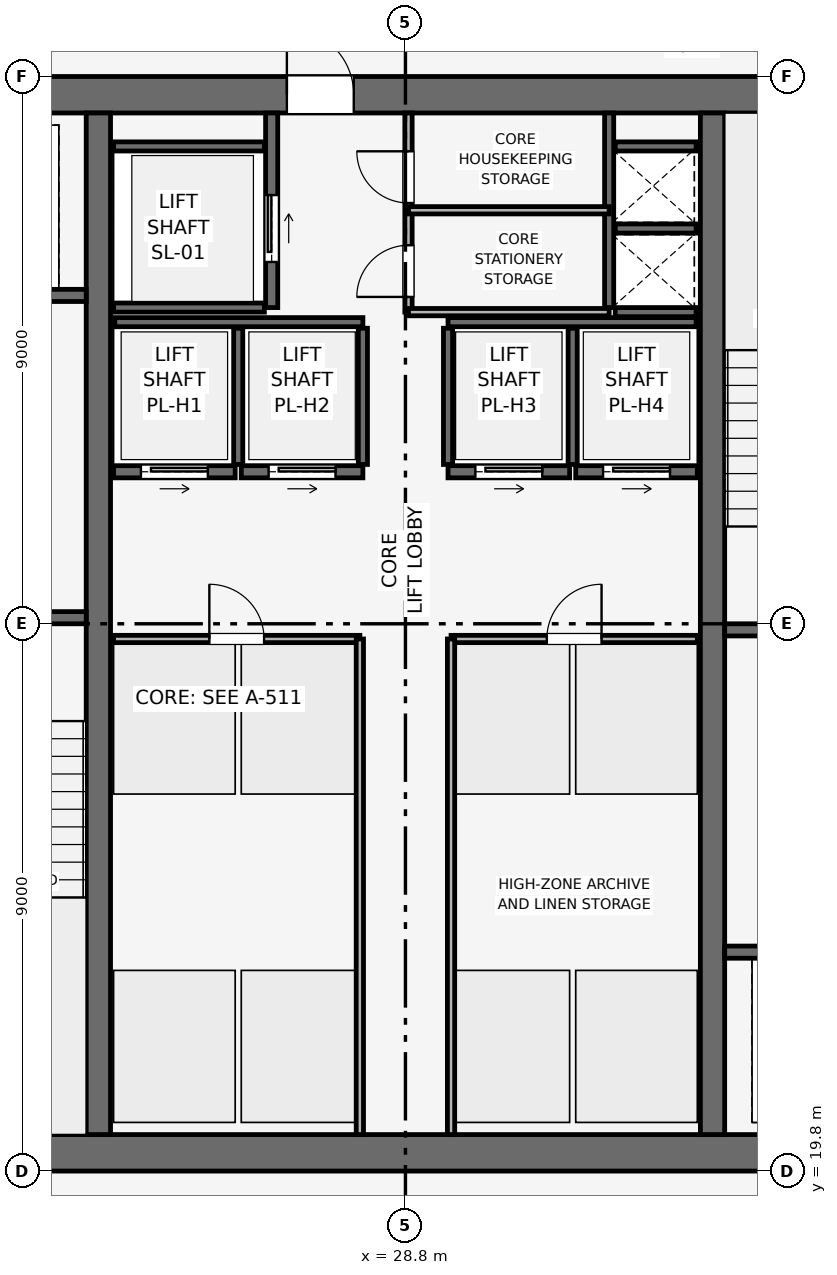
"""IFC4 building model, lengths in metres.
Left out: names, types, materials, properties, quantities, classifications, styles, units other than length and angle.
Written with IfcOpenShell. Run it as: python <this file> out.ifc"""

import sys

from ifc_helpers import new_model, si_unit, direction, frame, frame_2d, origin, place, context, subcontext, project, spatial, rectangle, extrude, element, fill, save


model = new_model("IFC4")
c1 = context("Model", 3, precision=1e-05, world=origin(), true_north=direction((0.0, 1.0)))
c2 = subcontext(c1, "Body", "Model", "MODEL_VIEW")
j1 = project(units=[si_unit("LENGTHUNIT", "METRE"), si_unit("PLANEANGLEUNIT", "RADIAN")], contexts=[c1])
p1 = place(None, origin())
s1 = spatial("IfcSite", under=j1, at=p1, CompositionType="ELEMENT")
p2 = place(p1, origin())
s2 = spatial("IfcBuilding", under=s1, at=p2, CompositionType="ELEMENT")
p3 = place(p2, frame((0.0, 0.0, 318.0)))
s3 = spatial("IfcBuildingStorey", under=s2, at=p3, CompositionType="ELEMENT", Elevation=318.0)
p4 = place(p3, frame((19.8, 20.1, 0.0), z_axis=(0.0, 0.0, 1.0), x_axis=(1.0, 0.0, 0.0)))
e1 = element("IfcWall", 1, at=p4, inside=s3, PredefinedType="SHEAR", context=c2, shape_type="SweptSolid", body=[
    extrude(rectangle(XDim=18.0, YDim=0.6, at=frame_2d((9.0, 0.0))), origin(), (0.0, 0.0, 1.0), 3.75),
])
p5 = place(p3, frame((19.8, 37.5, 0.0), z_axis=(0.0, 0.0, 1.0), x_axis=(1.0, 0.0, 0.0)))
e2 = element("IfcWall", 2, at=p5, inside=s3, PredefinedType="SHEAR", context=c2, shape_type="SweptSolid", body=[
    extrude(rectangle(XDim=18.0, YDim=0.6, at=frame_2d((9.0, 0.0))), origin(), (0.0, 0.0, 1.0), 3.75),
])
p6 = place(p5, frame((7.05, 0.0, 0.0)))
e3 = element("IfcOpeningElement", 3, at=p6, cuts=e2, PredefinedType="OPENING", context=c2, shape_type="SweptSolid", body=[
    extrude(rectangle(XDim=1.1, YDim=2.15, at=frame_2d((0.55, 1.075))), frame((0.0, 0.31, 0.0), z_axis=(0.0, -1.0, 0.0), x_axis=(1.0, 0.0, 0.0)), (0.0, 0.0, 1.0), 0.62),
])
for number, where, z_axis, x_axis in (
    (4, (23.75, 20.4, 0.0), (0.0, 0.0, 1.0), (0.0, 1.0, 0.0)),
    (5, (33.85, 20.4, 0.0), (0.0, 0.0, 1.0), (0.0, 1.0, 0.0)),
):
    element("IfcWall", number, at=place(p3, frame(where, z_axis=z_axis, x_axis=x_axis)), inside=s3, PredefinedType="SHEAR", context=c2, shape_type="SweptSolid", body=[
        extrude(rectangle(XDim=16.8, YDim=0.4, at=frame_2d((8.4, 0.0))), origin(), (0.0, 0.0, 1.0), 3.75),
    ])
p7 = place(p3, frame((20.4, 28.9, 0.0), z_axis=(0.0, 0.0, 1.0), x_axis=(1.0, 0.0, 0.0)))
e6 = element("IfcWall", 6, at=p7, inside=s3, PredefinedType="SHEAR", context=c2, shape_type="SweptSolid", body=[
    extrude(rectangle(XDim=3.15, YDim=0.2, at=frame_2d((1.575, 0.0))), origin(), (0.0, 0.0, 1.0), 3.51),
])
p8 = place(p7, frame((0.8, 0.0, 0.0)))
e7 = element("IfcOpeningElement", 7, at=p8, cuts=e6, PredefinedType="OPENING", context=c2, shape_type="SweptSolid", body=[
    extrude(rectangle(XDim=1.0, YDim=2.1, at=frame_2d((0.5, 1.05))), frame((0.0, 0.11, 0.0), z_axis=(0.0, -1.0, 0.0), x_axis=(1.0, 0.0, 0.0)), (0.0, 0.0, 1.0), 0.22),
])
p9 = place(p3, frame((34.05, 28.7, 0.0), z_axis=(0.0, 0.0, 1.0), x_axis=(1.0, 0.0, 0.0)))
e8 = element("IfcWall", 8, at=p9, inside=s3, PredefinedType="SHEAR", context=c2, shape_type="SweptSolid", body=[
    extrude(rectangle(XDim=3.15, YDim=0.2, at=frame_2d((1.575, 0.0))), origin(), (0.0, 0.0, 1.0), 3.51),
])
p10 = place(p9, frame((0.8, 0.0, 0.0)))
e9 = element("IfcOpeningElement", 9, at=p10, cuts=e8, PredefinedType="OPENING", context=c2, shape_type="SweptSolid", body=[
    extrude(rectangle(XDim=1.0, YDim=2.1, at=frame_2d((0.5, 1.05))), frame((0.0, 0.11, 0.0), z_axis=(0.0, -1.0, 0.0), x_axis=(1.0, 0.0, 0.0)), (0.0, 0.0, 1.0), 0.22),
])
p11 = place(p3, frame((32.15, 34.0, 0.0), z_axis=(0.0, 0.0, 1.0), x_axis=(0.0, 1.0, 0.0)))
e10 = element("IfcWall", 10, at=p11, inside=s3, PredefinedType="SHEAR", context=c2, shape_type="SweptSolid", body=[
    extrude(rectangle(XDim=3.2, YDim=0.15, at=frame_2d((1.6, 0.0))), origin(), (0.0, 0.0, 1.0), 3.51),
])
for number, where, z_axis, x_axis in (
    (11, (32.25, 33.925, 0.0), (0.0, 0.0, 1.0), (1.0, 0.0, 0.0)),
    (12, (32.25, 35.3, 0.0), (0.0, 0.0, 1.0), (1.0, 0.0, 0.0)),
):
    element("IfcWall", number, at=place(p3, frame(where, z_axis=z_axis, x_axis=x_axis)), inside=s3, PredefinedType="SHEAR", context=c2, shape_type="SweptSolid", body=[
        extrude(rectangle(XDim=1.33, YDim=0.15, at=frame_2d((0.665, 0.0))), origin(), (0.0, 0.0, 1.0), 3.51),
    ])
p12 = place(p3, frame((20.5, 34.2, 0.0), z_axis=(0.0, 0.0, 1.0), x_axis=(1.0, 0.0, 0.0)))
e13 = element("IfcWall", 13, at=p12, inside=s3, PredefinedType="SHEAR", context=c2, shape_type="SweptSolid", body=[
    extrude(rectangle(XDim=3.05, YDim=0.2, at=frame_2d((1.525, 0.0))), origin(), (0.0, 0.0, 1.0), 3.51),
])
p13 = place(p12, frame((0.75, 0.0, 0.0)))
e14 = element("IfcOpeningElement", 14, at=p13, cuts=e13, PredefinedType="OPENING", context=c2, shape_type="SweptSolid", body=[
    extrude(rectangle(XDim=1.1, YDim=2.15, at=frame_2d((0.55, 1.075))), frame((0.0, 0.11, 0.0), z_axis=(0.0, -1.0, 0.0), x_axis=(1.0, 0.0, 0.0)), (0.0, 0.0, 1.0), 0.22),
])
p14 = place(p3, frame((34.05, 23.4, 0.0), z_axis=(0.0, 0.0, 1.0), x_axis=(1.0, 0.0, 0.0)))
e15 = element("IfcWall", 15, at=p14, inside=s3, PredefinedType="SHEAR", context=c2, shape_type="SweptSolid", body=[
    extrude(rectangle(XDim=3.05, YDim=0.2, at=frame_2d((1.525, 0.0))), origin(), (0.0, 0.0, 1.0), 3.51),
])
p15 = place(p14, frame((1.2, 0.0, 0.0)))
e16 = element("IfcOpeningElement", 16, at=p15, cuts=e15, PredefinedType="OPENING", context=c2, shape_type="SweptSolid", body=[
    extrude(rectangle(XDim=1.1, YDim=2.15, at=frame_2d((0.55, 1.075))), frame((0.0, 0.11, 0.0), z_axis=(0.0, -1.0, 0.0), x_axis=(1.0, 0.0, 0.0)), (0.0, 0.0, 1.0), 0.22),
])
p16 = place(p3, frame((26.6, 34.0, 0.0), z_axis=(0.0, 0.0, 1.0), x_axis=(0.0, 1.0, 0.0)))
e17 = element("IfcWall", 17, at=p16, inside=s3, PredefinedType="SHEAR", context=c2, shape_type="SweptSolid", body=[
    extrude(rectangle(XDim=3.2, YDim=0.2, at=frame_2d((1.6, 0.0))), origin(), (0.0, 0.0, 1.0), 3.51),
])
p17 = place(p16, frame((0.75, 0.0, 0.0)))
e18 = element("IfcOpeningElement", 18, at=p17, cuts=e17, PredefinedType="OPENING", context=c2, shape_type="SweptSolid", body=[
    extrude(rectangle(XDim=1.1, YDim=2.15, at=frame_2d((0.55, 1.075))), frame((0.0, 0.11, 0.0), z_axis=(0.0, -1.0, 0.0), x_axis=(1.0, 0.0, 0.0)), (0.0, 0.0, 1.0), 0.22),
])
for number, where, z_axis, x_axis in (
    (19, (24.0, 34.0, 0.0), (0.0, 0.0, 1.0), (1.0, 0.0, 0.0)),
    (20, (24.0, 36.65, 0.0), (0.0, 0.0, 1.0), (1.0, 0.0, 0.0)),
):
    element("IfcWall", number, at=place(p3, frame(where, z_axis=z_axis, x_axis=x_axis)), inside=s3, PredefinedType="SHEAR", context=c2, shape_type="SweptSolid", body=[
        extrude(rectangle(XDim=2.48, YDim=0.15, at=frame_2d((1.24, 0.0))), origin(), (0.0, 0.0, 1.0), 3.51),
    ])
p18 = place(p3, frame((24.0, 31.3, 0.0), z_axis=(0.0, 0.0, 1.0), x_axis=(1.0, 0.0, 0.0)))
e21 = element("IfcWall", 21, at=p18, inside=s3, PredefinedType="SHEAR", context=c2, shape_type="SweptSolid", body=[
    extrude(rectangle(XDim=2.0, YDim=0.2, at=frame_2d((1.0, 0.0))), origin(), (0.0, 0.0, 1.0), 3.51),
])
p19 = place(p18, frame((0.45, 0.0, 0.0)))
e22 = element("IfcOpeningElement", 22, at=p19, cuts=e21, PredefinedType="OPENING", context=c2, shape_type="SweptSolid", body=[
    extrude(rectangle(XDim=1.1, YDim=2.15, at=frame_2d((0.55, 1.075))), frame((0.0, 0.11, 0.0), z_axis=(0.0, -1.0, 0.0), x_axis=(1.0, 0.0, 0.0)), (0.0, 0.0, 1.0), 0.22),
])
p20 = place(p3, frame((26.1, 31.3, 0.0), z_axis=(0.0, 0.0, 1.0), x_axis=(1.0, 0.0, 0.0)))
e23 = element("IfcWall", 23, at=p20, inside=s3, PredefinedType="SHEAR", context=c2, shape_type="SweptSolid", body=[
    extrude(rectangle(XDim=2.0, YDim=0.2, at=frame_2d((1.0, 0.0))), origin(), (0.0, 0.0, 1.0), 3.51),
])
p21 = place(p20, frame((0.45, 0.0, 0.0)))
e24 = element("IfcOpeningElement", 24, at=p21, cuts=e23, PredefinedType="OPENING", context=c2, shape_type="SweptSolid", body=[
    extrude(rectangle(XDim=1.1, YDim=2.15, at=frame_2d((0.55, 1.075))), frame((0.0, 0.11, 0.0), z_axis=(0.0, -1.0, 0.0), x_axis=(1.0, 0.0, 0.0)), (0.0, 0.0, 1.0), 0.22),
])
p22 = place(p3, frame((29.5, 31.3, 0.0), z_axis=(0.0, 0.0, 1.0), x_axis=(1.0, 0.0, 0.0)))
e25 = element("IfcWall", 25, at=p22, inside=s3, PredefinedType="SHEAR", context=c2, shape_type="SweptSolid", body=[
    extrude(rectangle(XDim=2.0, YDim=0.2, at=frame_2d((1.0, 0.0))), origin(), (0.0, 0.0, 1.0), 3.51),
])
p23 = place(p22, frame((0.45, 0.0, 0.0)))
e26 = element("IfcOpeningElement", 26, at=p23, cuts=e25, PredefinedType="OPENING", context=c2, shape_type="SweptSolid", body=[
    extrude(rectangle(XDim=1.1, YDim=2.15, at=frame_2d((0.55, 1.075))), frame((0.0, 0.11, 0.0), z_axis=(0.0, -1.0, 0.0), x_axis=(1.0, 0.0, 0.0)), (0.0, 0.0, 1.0), 0.22),
])
p24 = place(p3, frame((31.6, 31.3, 0.0), z_axis=(0.0, 0.0, 1.0), x_axis=(1.0, 0.0, 0.0)))
e27 = element("IfcWall", 27, at=p24, inside=s3, PredefinedType="SHEAR", context=c2, shape_type="SweptSolid", body=[
    extrude(rectangle(XDim=2.0, YDim=0.2, at=frame_2d((1.0, 0.0))), origin(), (0.0, 0.0, 1.0), 3.51),
])
p25 = place(p24, frame((0.45, 0.0, 0.0)))
e28 = element("IfcOpeningElement", 28, at=p25, cuts=e27, PredefinedType="OPENING", context=c2, shape_type="SweptSolid", body=[
    extrude(rectangle(XDim=1.1, YDim=2.15, at=frame_2d((0.55, 1.075))), frame((0.0, 0.11, 0.0), z_axis=(0.0, -1.0, 0.0), x_axis=(1.0, 0.0, 0.0)), (0.0, 0.0, 1.0), 0.22),
])
p26 = place(p3, frame((32.25, 36.65, 0.0), z_axis=(0.0, 0.0, 1.0), x_axis=(1.0, 0.0, 0.0)))
e29 = element("IfcWall", 29, at=p26, inside=s3, PredefinedType="SHEAR", context=c2, shape_type="SweptSolid", body=[
    extrude(rectangle(XDim=1.33, YDim=0.15, at=frame_2d((0.665, 0.0))), origin(), (0.0, 0.0, 1.0), 3.51),
])
for number, where, z_axis, x_axis in (
    (30, (24.02, 33.76, 0.0), (0.0, 0.0, 1.0), (1.0, 0.0, 0.0)),
    (31, (29.5, 33.76, 0.0), (0.0, 0.0, 1.0), (1.0, 0.0, 0.0)),
):
    element("IfcWall", number, at=place(p3, frame(where, z_axis=z_axis, x_axis=x_axis)), inside=s3, PredefinedType="SHEAR", context=c2, shape_type="SweptSolid", body=[
        extrude(rectangle(XDim=4.08, YDim=0.15, at=frame_2d((2.04, 0.0))), origin(), (0.0, 0.0, 1.0), 3.51),
    ])
for number, where, z_axis, x_axis in (
    (32, (26.05, 31.42, 0.0), (0.0, 0.0, 1.0), (0.0, 1.0, 0.0)),
    (33, (28.1, 31.42, 0.0), (0.0, 0.0, 1.0), (0.0, 1.0, 0.0)),
    (34, (29.5, 31.42, 0.0), (0.0, 0.0, 1.0), (0.0, 1.0, 0.0)),
    (35, (31.55, 31.42, 0.0), (0.0, 0.0, 1.0), (0.0, 1.0, 0.0)),
):
    element("IfcWall", number, at=place(p3, frame(where, z_axis=z_axis, x_axis=x_axis)), inside=s3, PredefinedType="SHEAR", context=c2, shape_type="SweptSolid", body=[
        extrude(rectangle(XDim=2.24, YDim=0.15, at=frame_2d((1.12, 0.0))), origin(), (0.0, 0.0, 1.0), 3.51),
    ])
p27 = place(p3, frame((28.85, 33.925, 0.0), z_axis=(0.0, 0.0, 1.0), x_axis=(0.0, 1.0, 0.0)))
e36 = element("IfcWall", 36, at=p27, inside=s3, PredefinedType="PARTITIONING", context=c2, shape_type="SweptSolid", body=[
    extrude(rectangle(XDim=3.275, YDim=0.12, at=frame_2d((1.637, 0.0))), origin(), (0.0, 0.0, 1.0), 3.51),
])
p28 = place(p27, frame((0.25, 0.0, 0.0)))
e37 = element("IfcOpeningElement", 37, at=p28, cuts=e36, PredefinedType="OPENING", context=c2, shape_type="SweptSolid", body=[
    extrude(rectangle(XDim=0.85, YDim=2.1, at=frame_2d((0.425, 1.05))), frame((0.0, 0.07, 0.0), z_axis=(0.0, -1.0, 0.0), x_axis=(1.0, 0.0, 0.0)), (0.0, 0.0, 1.0), 0.14),
])
p29 = place(p27, frame((1.795, 0.0, 0.0)))
e38 = element("IfcOpeningElement", 38, at=p29, cuts=e36, PredefinedType="OPENING", context=c2, shape_type="SweptSolid", body=[
    extrude(rectangle(XDim=0.85, YDim=2.1, at=frame_2d((0.425, 1.05))), frame((0.0, 0.07, 0.0), z_axis=(0.0, -1.0, 0.0), x_axis=(1.0, 0.0, 0.0)), (0.0, 0.0, 1.0), 0.14),
])
for number, where, z_axis, x_axis in (
    (39, (28.85, 35.6, 0.0), (0.0, 0.0, 1.0), (1.0, 0.0, 0.0)),
    (40, (28.85, 33.925, 0.0), (0.0, 0.0, 1.0), (1.0, 0.0, 0.0)),
):
    element("IfcWall", number, at=place(p3, frame(where, z_axis=z_axis, x_axis=x_axis)), inside=s3, PredefinedType="PARTITIONING", context=c2, shape_type="SweptSolid", body=[
        extrude(rectangle(XDim=3.3, YDim=0.12, at=frame_2d((1.65, 0.0))), origin(), (0.0, 0.0, 1.0), 3.51),
    ])
p30 = place(p3, frame((24.0, 28.55, 0.0), z_axis=(0.0, 0.0, 1.0), x_axis=(1.0, 0.0, 0.0)))
e41 = element("IfcWall", 41, at=p30, inside=s3, PredefinedType="PARTITIONING", context=c2, shape_type="SweptSolid", body=[
    extrude(rectangle(XDim=4.05, YDim=0.12, at=frame_2d((2.025, 0.0))), origin(), (0.0, 0.0, 1.0), 3.51),
])
p31 = place(p30, frame((1.575, 0.0, 0.0)))
e42 = element("IfcOpeningElement", 42, at=p31, cuts=e41, PredefinedType="OPENING", context=c2, shape_type="SweptSolid", body=[
    extrude(rectangle(XDim=0.9, YDim=2.1, at=frame_2d((0.45, 1.05))), frame((0.0, 0.07, 0.0), z_axis=(0.0, -1.0, 0.0), x_axis=(1.0, 0.0, 0.0)), (0.0, 0.0, 1.0), 0.14),
])
p32 = place(p3, frame((28.05, 20.4, 0.0), z_axis=(0.0, 0.0, 1.0), x_axis=(0.0, 1.0, 0.0)))
e43 = element("IfcWall", 43, at=p32, inside=s3, PredefinedType="PARTITIONING", context=c2, shape_type="SweptSolid", body=[
    extrude(rectangle(XDim=8.15, YDim=0.12, at=frame_2d((4.075, 0.0))), origin(), (0.0, 0.0, 1.0), 3.51),
])
p33 = place(p3, frame((29.55, 28.55, 0.0), z_axis=(0.0, 0.0, 1.0), x_axis=(1.0, 0.0, 0.0)))
e44 = element("IfcWall", 44, at=p33, inside=s3, PredefinedType="PARTITIONING", context=c2, shape_type="SweptSolid", body=[
    extrude(rectangle(XDim=4.05, YDim=0.12, at=frame_2d((2.025, 0.0))), origin(), (0.0, 0.0, 1.0), 3.51),
])
p34 = place(p33, frame((1.575, 0.0, 0.0)))
e45 = element("IfcOpeningElement", 45, at=p34, cuts=e44, PredefinedType="OPENING", context=c2, shape_type="SweptSolid", body=[
    extrude(rectangle(XDim=0.9, YDim=2.1, at=frame_2d((0.45, 1.05))), frame((0.0, 0.07, 0.0), z_axis=(0.0, -1.0, 0.0), x_axis=(1.0, 0.0, 0.0)), (0.0, 0.0, 1.0), 0.14),
])
p35 = place(p3, frame((29.55, 20.4, 0.0), z_axis=(0.0, 0.0, 1.0), x_axis=(0.0, 1.0, 0.0)))
e46 = element("IfcWall", 46, at=p35, inside=s3, PredefinedType="PARTITIONING", context=c2, shape_type="SweptSolid", body=[
    extrude(rectangle(XDim=8.15, YDim=0.12, at=frame_2d((4.075, 0.0))), origin(), (0.0, 0.0, 1.0), 3.51),
])
p36 = place(p17, origin())
e47 = element("IfcDoor", 47, at=p36, inside=s3, OperationType="SLIDING_TO_RIGHT", PredefinedType="DOOR", context=c2, shape_type="SweptSolid", body=[
    extrude(rectangle(XDim=1.1, YDim=2.15, at=frame_2d((0.55, 1.075))), frame((0.0, 0.025, 0.0), z_axis=(0.0, -1.0, 0.0), x_axis=(1.0, 0.0, 0.0)), (0.0, 0.0, 1.0), 0.05),
])
fill(e18, e47)
p37 = place(p19, origin())
e48 = element("IfcDoor", 48, at=p37, inside=s3, OperationType="SLIDING_TO_RIGHT", PredefinedType="DOOR", context=c2, shape_type="SweptSolid", body=[
    extrude(rectangle(XDim=1.1, YDim=2.15, at=frame_2d((0.55, 1.075))), frame((0.0, 0.025, 0.0), z_axis=(0.0, -1.0, 0.0), x_axis=(1.0, 0.0, 0.0)), (0.0, 0.0, 1.0), 0.05),
])
fill(e22, e48)
p38 = place(p21, origin())
e49 = element("IfcDoor", 49, at=p38, inside=s3, OperationType="SLIDING_TO_RIGHT", PredefinedType="DOOR", context=c2, shape_type="SweptSolid", body=[
    extrude(rectangle(XDim=1.1, YDim=2.15, at=frame_2d((0.55, 1.075))), frame((0.0, 0.025, 0.0), z_axis=(0.0, -1.0, 0.0), x_axis=(1.0, 0.0, 0.0)), (0.0, 0.0, 1.0), 0.05),
])
fill(e24, e49)
p39 = place(p23, origin())
e50 = element("IfcDoor", 50, at=p39, inside=s3, OperationType="SLIDING_TO_RIGHT", PredefinedType="DOOR", context=c2, shape_type="SweptSolid", body=[
    extrude(rectangle(XDim=1.1, YDim=2.15, at=frame_2d((0.55, 1.075))), frame((0.0, 0.025, 0.0), z_axis=(0.0, -1.0, 0.0), x_axis=(1.0, 0.0, 0.0)), (0.0, 0.0, 1.0), 0.05),
])
fill(e26, e50)
p40 = place(p25, origin())
e51 = element("IfcDoor", 51, at=p40, inside=s3, OperationType="SLIDING_TO_RIGHT", PredefinedType="DOOR", context=c2, shape_type="SweptSolid", body=[
    extrude(rectangle(XDim=1.1, YDim=2.15, at=frame_2d((0.55, 1.075))), frame((0.0, 0.025, 0.0), z_axis=(0.0, -1.0, 0.0), x_axis=(1.0, 0.0, 0.0)), (0.0, 0.0, 1.0), 0.05),
])
fill(e28, e51)
p41 = place(p28, origin())
e52 = element("IfcDoor", 52, at=p41, inside=s3, OperationType="SINGLE_SWING_LEFT", PredefinedType="DOOR", context=c2, shape_type="SweptSolid", body=[
    extrude(rectangle(XDim=0.85, YDim=2.1, at=frame_2d((0.425, 1.05))), frame((0.0, 0.025, 0.0), z_axis=(0.0, -1.0, 0.0), x_axis=(1.0, 0.0, 0.0)), (0.0, 0.0, 1.0), 0.05),
])
fill(e37, e52)
p42 = place(p29, origin())
e53 = element("IfcDoor", 53, at=p42, inside=s3, OperationType="SINGLE_SWING_RIGHT", PredefinedType="DOOR", context=c2, shape_type="SweptSolid", body=[
    extrude(rectangle(XDim=0.85, YDim=2.1, at=frame_2d((0.425, 1.05))), frame((0.0, 0.025, 0.0), z_axis=(0.0, -1.0, 0.0), x_axis=(1.0, 0.0, 0.0)), (0.0, 0.0, 1.0), 0.05),
])
fill(e38, e53)
p43 = place(p31, origin())
e54 = element("IfcDoor", 54, at=p43, inside=s3, OperationType="SINGLE_SWING_LEFT", PredefinedType="DOOR", context=c2, shape_type="SweptSolid", body=[
    extrude(rectangle(XDim=0.9, YDim=2.1, at=frame_2d((0.45, 1.05))), frame((0.0, 0.025, 0.0), z_axis=(0.0, -1.0, 0.0), x_axis=(1.0, 0.0, 0.0)), (0.0, 0.0, 1.0), 0.05),
])
fill(e42, e54)
p44 = place(p34, origin())
e55 = element("IfcDoor", 55, at=p44, inside=s3, OperationType="SINGLE_SWING_RIGHT", PredefinedType="DOOR", context=c2, shape_type="SweptSolid", body=[
    extrude(rectangle(XDim=0.9, YDim=2.1, at=frame_2d((0.45, 1.05))), frame((0.0, 0.025, 0.0), z_axis=(0.0, -1.0, 0.0), x_axis=(1.0, 0.0, 0.0)), (0.0, 0.0, 1.0), 0.05),
])
fill(e45, e55)
p45 = place(p6, origin())
e56 = element("IfcDoor", 56, at=p45, inside=s3, OperationType="SINGLE_SWING_LEFT", PredefinedType="DOOR", context=c2, shape_type="SweptSolid", body=[
    extrude(rectangle(XDim=1.1, YDim=2.15, at=frame_2d((0.55, 1.075))), frame((0.0, 0.025, 0.0), z_axis=(0.0, -1.0, 0.0), x_axis=(1.0, 0.0, 0.0)), (0.0, 0.0, 1.0), 0.05),
])
fill(e3, e56)
save(model, sys.argv[1])
